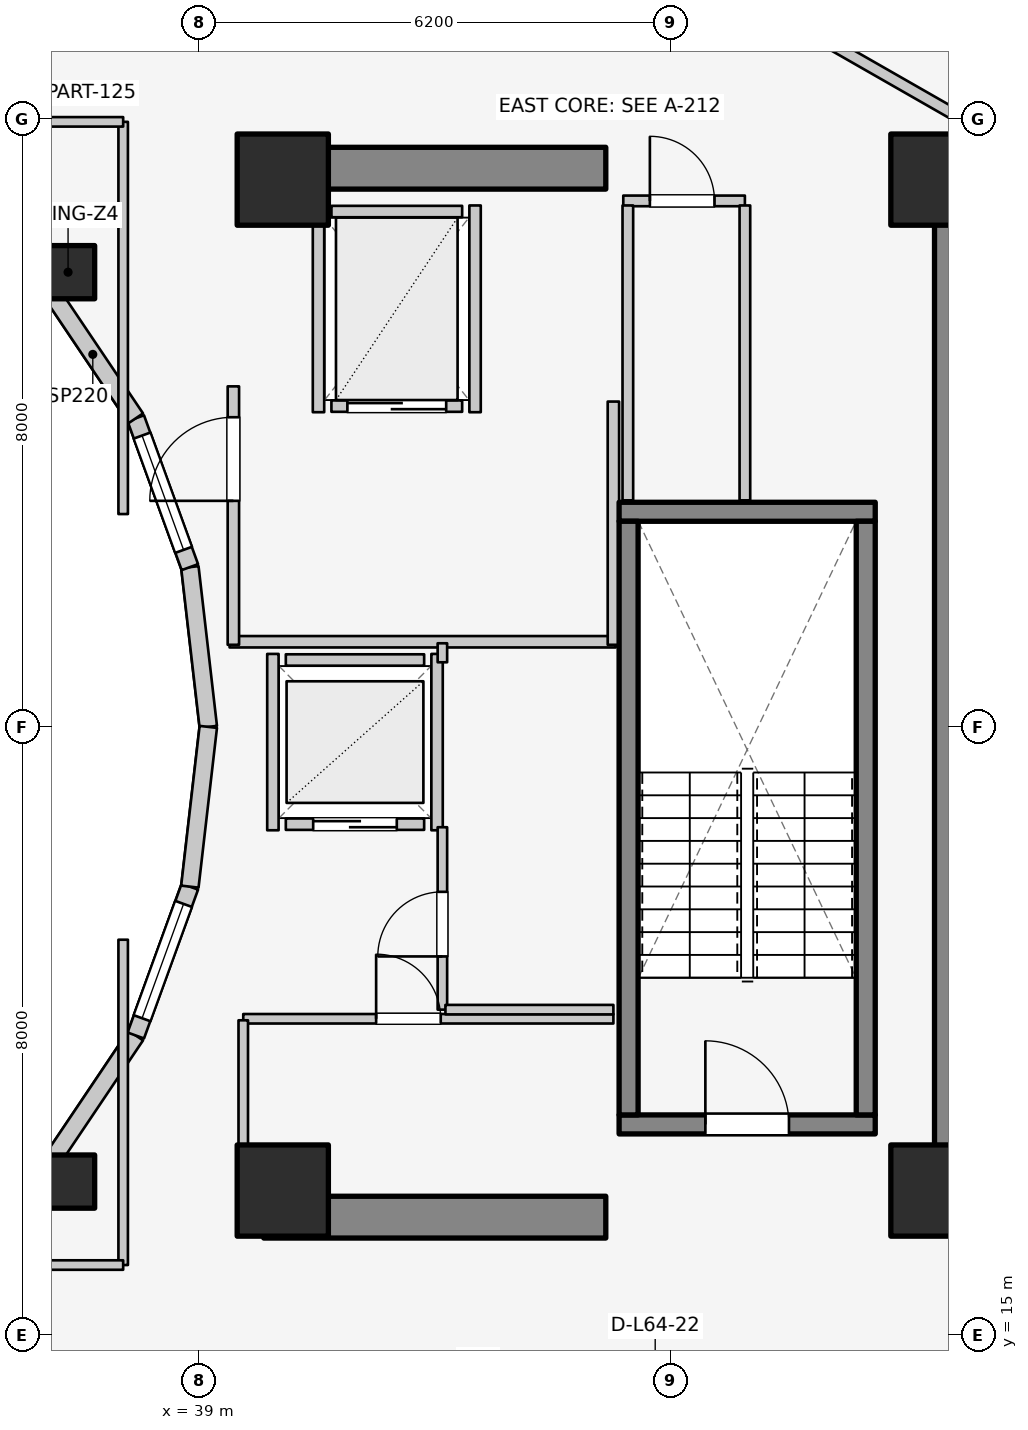
"""IFC4 building model, lengths in metres.
Left out: names, types, materials, properties, quantities, classifications, styles, units other than length and angle.
Written with IfcOpenShell. Run it as: python <this file> out.ifc"""

import sys

from ifc_helpers import new_model, si_unit, direction, frame, frame_2d, origin, origin_2d, place, context, subcontext, project, spatial, rectangle, extrude, element, fill, save


model = new_model("IFC4")
c1 = context("Model", 3, precision=1e-05, world=origin(), true_north=direction((0.0, 1.0)))
c2 = subcontext(c1, "Body", "Model", "MODEL_VIEW")
j1 = project(units=[si_unit("LENGTHUNIT", "METRE"), si_unit("PLANEANGLEUNIT", "RADIAN")], contexts=[c1])
p1 = place(None, origin())
s1 = spatial("IfcSite", under=j1, at=p1, CompositionType="ELEMENT")
p2 = place(p1, origin())
s2 = spatial("IfcBuilding", under=s1, at=p2, CompositionType="ELEMENT")
p3 = place(p2, frame((0.0, 0.0, 210.9)))
s3 = spatial("IfcBuildingStorey", under=s2, at=p3, CompositionType="ELEMENT", Elevation=210.9)
p4 = place(p3, frame((48.95, 17.05, 0.0), z_axis=(0.0, 0.0, 1.0), x_axis=(0.0, 1.0, 0.0)))
e1 = element("IfcWall", 1, at=p4, inside=s3, PredefinedType="SHEAR", context=c2, shape_type="SweptSolid", body=[
    extrude(rectangle(XDim=12.8, YDim=0.55, at=frame_2d((6.4, 0.0))), origin(), (0.0, 0.0, 1.0), 3.1),
])
for number, where, z_axis, x_axis in (
    (2, (39.85, 16.55, 0.0), (0.0, 0.0, 1.0), (1.0, 0.0, 0.0)),
    (3, (39.85, 30.35, 0.0), (0.0, 0.0, 1.0), (1.0, 0.0, 0.0)),
):
    element("IfcWall", number, at=place(p3, frame(where, z_axis=z_axis, x_axis=x_axis)), inside=s3, PredefinedType="SHEAR", context=c2, shape_type="SweptSolid", body=[
        extrude(rectangle(XDim=4.5, YDim=0.55, at=frame_2d((2.25, 0.0))), origin(), (0.0, 0.0, 1.0), 3.1),
    ])
p5 = place(p3, frame((44.525, 17.77, 0.0), z_axis=(0.0, 0.0, 1.0), x_axis=(1.0, 0.0, 0.0)))
e4 = element("IfcWall", 4, at=p5, inside=s3, PredefinedType="SOLIDWALL", context=c2, shape_type="SweptSolid", body=[
    extrude(rectangle(XDim=3.37, YDim=0.25, at=frame_2d((1.685, 0.0))), origin(), (0.0, 0.0, 1.0), 3.1),
])
p6 = place(p5, frame((1.135, 0.0, 0.0)))
e5 = element("IfcOpeningElement", 5, at=p6, cuts=e4, PredefinedType="OPENING", context=c2, shape_type="SweptSolid", body=[
    extrude(rectangle(XDim=1.1, YDim=2.1, at=frame_2d((0.55, 1.05))), frame((0.0, 0.135, 0.0), z_axis=(0.0, -1.0, 0.0), x_axis=(1.0, 0.0, 0.0)), (0.0, 0.0, 1.0), 0.27),
])
p7 = place(p3, frame((44.525, 25.83, 0.0), z_axis=(0.0, 0.0, 1.0), x_axis=(1.0, 0.0, 0.0)))
e6 = element("IfcWall", 6, at=p7, inside=s3, PredefinedType="SOLIDWALL", context=c2, shape_type="SweptSolid", body=[
    extrude(rectangle(XDim=3.37, YDim=0.25, at=frame_2d((1.685, 0.0))), origin(), (0.0, 0.0, 1.0), 3.1),
])
for number, where, z_axis, x_axis in (
    (7, (44.65, 17.895, 0.0), (0.0, 0.0, 1.0), (0.0, 1.0, 0.0)),
    (8, (47.77, 17.895, 0.0), (0.0, 0.0, 1.0), (0.0, 1.0, 0.0)),
):
    element("IfcWall", number, at=place(p3, frame(where, z_axis=z_axis, x_axis=x_axis)), inside=s3, PredefinedType="SOLIDWALL", context=c2, shape_type="SweptSolid", body=[
        extrude(rectangle(XDim=7.81, YDim=0.25, at=frame_2d((3.905, 0.0))), origin(), (0.0, 0.0, 1.0), 3.1),
    ])
for number, where, z_axis, x_axis in (
    (9, (40.1, 16.9, 0.0), (0.0, 0.0, 1.0), (1.0, 0.0, 0.0)),
    (10, (48.7, 16.9, 0.0), (0.0, 0.0, 1.0), (1.0, 0.0, 0.0)),
    (11, (48.7, 30.2, 0.0), (0.0, 0.0, 1.0), (1.0, 0.0, 0.0)),
    (12, (40.1, 30.2, 0.0), (0.0, 0.0, 1.0), (1.0, 0.0, 0.0)),
):
    element("IfcColumn", number, at=place(p3, frame(where, z_axis=z_axis, x_axis=x_axis)), inside=s3, PredefinedType="COLUMN", context=c2, shape_type="SweptSolid", body=[
        extrude(rectangle(XDim=1.2, YDim=1.2, at=origin_2d()), origin(), (0.0, 0.0, 1.0), 3.1),
    ])
for number, where, z_axis, x_axis in (
    (13, (37.275, 28.982, 0.0), (0.0, 0.0, 1.0), (1.0, 0.0, 0.0)),
    (14, (37.275, 17.018, 0.0), (0.0, 0.0, 1.0), (1.0, 0.0, 0.0)),
):
    element("IfcColumn", number, at=place(p3, frame(where, z_axis=z_axis, x_axis=x_axis)), inside=s3, PredefinedType="COLUMN", context=c2, shape_type="SweptSolid", body=[
        extrude(rectangle(XDim=0.7, YDim=0.7, at=origin_2d()), origin(), (0.0, 0.0, 1.0), 3.1),
    ])
p8 = place(p3, frame((39.12, 23.0, 0.0), z_axis=(0.0, 0.0, 1.0), x_axis=(-0.114711713601, 0.993398823617, 0.0)))
e15 = element("IfcWall", 15, at=p8, inside=s3, PredefinedType="STANDARD", context=c2, shape_type="SweptSolid", body=[
    extrude(rectangle(XDim=2.115, YDim=0.23, at=frame_2d((1.058, 0.0))), origin(), (0.0, 0.0, 1.0), 2.84),
])
p9 = place(p3, frame((38.877, 25.102, 0.0), z_axis=(0.0, 0.0, 1.0), x_axis=(-0.341423187295, 0.93990968033, 0.0)))
e16 = element("IfcWall", 16, at=p9, inside=s3, PredefinedType="STANDARD", context=c2, shape_type="SweptSolid", body=[
    extrude(rectangle(XDim=2.084, YDim=0.23, at=frame_2d((1.042, 0.0))), origin(), (0.0, 0.0, 1.0), 2.84),
])
p10 = place(p9, frame((0.242, 0.0, 0.85)))
e17 = element("IfcOpeningElement", 17, at=p10, cuts=e16, PredefinedType="OPENING", context=c2, shape_type="SweptSolid", body=[
    extrude(rectangle(XDim=1.6, YDim=1.65, at=frame_2d((0.8, 0.825))), frame((0.0, 0.125, 0.0), z_axis=(0.0, -1.0, 0.0), x_axis=(1.0, 0.0, 0.0)), (0.0, 0.0, 1.0), 0.25),
])
p11 = place(p3, frame((38.166, 27.06, 0.0), z_axis=(0.0, 0.0, 1.0), x_axis=(-0.558197800898, 0.829707909492, 0.0)))
e18 = element("IfcWall", 18, at=p11, inside=s3, PredefinedType="STANDARD", context=c2, shape_type="SweptSolid", body=[
    extrude(rectangle(XDim=2.027, YDim=0.23, at=frame_2d((1.013, 0.0))), origin(), (0.0, 0.0, 1.0), 2.16),
])
for number, where, z_axis, x_axis in (
    (19, (37.035, 28.742, 0.0), (0.0, 0.0, 1.0), (-0.753, 0.659, 0.0)),
    (20, (35.56, 15.968, 0.0), (0.0, 0.0, 1.0), (0.753, 0.659, 0.0)),
):
    element("IfcWall", number, at=place(p3, frame(where, z_axis=z_axis, x_axis=x_axis)), inside=s3, PredefinedType="STANDARD", context=c2, shape_type="SweptSolid", body=[
        extrude(rectangle(XDim=1.959, YDim=0.23, at=frame_2d((0.98, 0.0))), origin(), (0.0, 0.0, 1.0), 2.16),
    ])
p12 = place(p3, frame((37.035, 17.258, 0.0), z_axis=(0.0, 0.0, 1.0), x_axis=(0.558197800898, 0.829707909492, 0.0)))
e21 = element("IfcWall", 21, at=p12, inside=s3, PredefinedType="STANDARD", context=c2, shape_type="SweptSolid", body=[
    extrude(rectangle(XDim=2.027, YDim=0.23, at=frame_2d((1.013, 0.0))), origin(), (0.0, 0.0, 1.0), 2.16),
])
p13 = place(p3, frame((38.166, 18.94, 0.0), z_axis=(0.0, 0.0, 1.0), x_axis=(0.341423187295, 0.93990968033, 0.0)))
e22 = element("IfcWall", 22, at=p13, inside=s3, PredefinedType="STANDARD", context=c2, shape_type="SweptSolid", body=[
    extrude(rectangle(XDim=2.084, YDim=0.23, at=frame_2d((1.042, 0.0))), origin(), (0.0, 0.0, 1.0), 2.84),
])
p14 = place(p13, frame((0.242, 0.0, 0.85)))
e23 = element("IfcOpeningElement", 23, at=p14, cuts=e22, PredefinedType="OPENING", context=c2, shape_type="SweptSolid", body=[
    extrude(rectangle(XDim=1.6, YDim=1.65, at=frame_2d((0.8, 0.825))), frame((0.0, 0.125, 0.0), z_axis=(0.0, -1.0, 0.0), x_axis=(1.0, 0.0, 0.0)), (0.0, 0.0, 1.0), 0.25),
])
p15 = place(p3, frame((38.877, 20.898, 0.0), z_axis=(0.0, 0.0, 1.0), x_axis=(0.114711713601, 0.993398823617, 0.0)))
e24 = element("IfcWall", 24, at=p15, inside=s3, PredefinedType="STANDARD", context=c2, shape_type="SweptSolid", body=[
    extrude(rectangle(XDim=2.115, YDim=0.23, at=frame_2d((1.058, 0.0))), origin(), (0.0, 0.0, 1.0), 2.84),
])
p16 = place(p3, frame((50.761, 31.809, 0.0), z_axis=(0.0, 0.0, 1.0), x_axis=(-0.792713817907, 0.609593965603, 0.0)))
e25 = element("IfcWall", 25, at=p16, inside=s3, PredefinedType="STANDARD", context=c2, shape_type="SweptSolid", body=[
    extrude(rectangle(XDim=4.041, YDim=0.26, at=frame_2d((2.021, 0.0))), origin(), (0.0, 0.0, 1.0), 2.85),
])
p17 = place(p16, frame((1.271, 0.0, 0.75)))
e26 = element("IfcOpeningElement", 26, at=p17, cuts=e25, PredefinedType="OPENING", context=c2, shape_type="SweptSolid", body=[
    extrude(rectangle(XDim=1.5, YDim=1.6, at=frame_2d((0.75, 0.8))), frame((0.0, 0.14, 0.0), z_axis=(0.0, -1.0, 0.0), x_axis=(1.0, 0.0, 0.0)), (0.0, 0.0, 1.0), 0.28),
])
p18 = place(p3, frame((40.14, 21.72, 0.0), z_axis=(0.0, 0.0, 1.0), x_axis=(1.0, 0.0, 0.0)))
e27 = element("IfcWall", 27, at=p18, inside=s3, PredefinedType="SOLIDWALL", context=c2, shape_type="SweptSolid", body=[
    extrude(rectangle(XDim=1.82, YDim=0.15, at=frame_2d((0.91, 0.0))), origin(), (0.0, 0.0, 1.0), 2.12),
])
p19 = place(p18, frame((0.36, 0.0, 0.0)))
e28 = element("IfcOpeningElement", 28, at=p19, cuts=e27, PredefinedType="OPENING", context=c2, shape_type="SweptSolid", body=[
    extrude(rectangle(XDim=1.1, YDim=2.1, at=frame_2d((0.55, 1.05))), frame((0.0, 0.085, 0.0), z_axis=(0.0, -1.0, 0.0), x_axis=(1.0, 0.0, 0.0)), (0.0, 0.0, 1.0), 0.17),
])
p20 = place(p3, frame((40.14, 23.88, 0.0), z_axis=(0.0, 0.0, 1.0), x_axis=(1.0, 0.0, 0.0)))
e29 = element("IfcWall", 29, at=p20, inside=s3, PredefinedType="SOLIDWALL", context=c2, shape_type="SweptSolid", body=[
    extrude(rectangle(XDim=1.82, YDim=0.15, at=frame_2d((0.91, 0.0))), origin(), (0.0, 0.0, 1.0), 2.12),
])
p21 = place(p3, frame((39.97, 21.64, 0.0), z_axis=(0.0, 0.0, 1.0), x_axis=(0.0, 1.0, 0.0)))
e30 = element("IfcWall", 30, at=p21, inside=s3, PredefinedType="SOLIDWALL", context=c2, shape_type="SweptSolid", body=[
    extrude(rectangle(XDim=2.32, YDim=0.15, at=frame_2d((1.16, 0.0))), origin(), (0.0, 0.0, 1.0), 2.12),
])
p22 = place(p3, frame((42.13, 21.64, 0.0), z_axis=(0.0, 0.0, 1.0), x_axis=(0.0, 1.0, 0.0)))
e31 = element("IfcWall", 31, at=p22, inside=s3, PredefinedType="SOLIDWALL", context=c2, shape_type="SweptSolid", body=[
    extrude(rectangle(XDim=2.32, YDim=0.15, at=frame_2d((1.16, 0.0))), origin(), (0.0, 0.0, 1.0), 2.855),
])
p23 = place(p3, frame((40.74, 27.22, 0.0), z_axis=(0.0, 0.0, 1.0), x_axis=(1.0, 0.0, 0.0)))
e32 = element("IfcWall", 32, at=p23, inside=s3, PredefinedType="SOLIDWALL", context=c2, shape_type="SweptSolid", body=[
    extrude(rectangle(XDim=1.72, YDim=0.15, at=frame_2d((0.86, 0.0))), origin(), (0.0, 0.0, 1.0), 2.855),
])
p24 = place(p23, frame((0.21, 0.0, 0.0)))
e33 = element("IfcOpeningElement", 33, at=p24, cuts=e32, PredefinedType="OPENING", context=c2, shape_type="SweptSolid", body=[
    extrude(rectangle(XDim=1.3, YDim=2.1, at=frame_2d((0.65, 1.05))), frame((0.0, 0.085, 0.0), z_axis=(0.0, -1.0, 0.0), x_axis=(1.0, 0.0, 0.0)), (0.0, 0.0, 1.0), 0.17),
])
p25 = place(p3, frame((40.74, 29.78, 0.0), z_axis=(0.0, 0.0, 1.0), x_axis=(1.0, 0.0, 0.0)))
e34 = element("IfcWall", 34, at=p25, inside=s3, PredefinedType="SOLIDWALL", context=c2, shape_type="SweptSolid", body=[
    extrude(rectangle(XDim=1.72, YDim=0.15, at=frame_2d((0.86, 0.0))), origin(), (0.0, 0.0, 1.0), 2.855),
])
for number, where, z_axis, x_axis in (
    (35, (40.57, 27.14, 0.0), (0.0, 0.0, 1.0), (0.0, 1.0, 0.0)),
    (36, (42.63, 27.14, 0.0), (0.0, 0.0, 1.0), (0.0, 1.0, 0.0)),
):
    element("IfcWall", number, at=place(p3, frame(where, z_axis=z_axis, x_axis=x_axis)), inside=s3, PredefinedType="SOLIDWALL", context=c2, shape_type="SweptSolid", body=[
        extrude(rectangle(XDim=2.72, YDim=0.15, at=frame_2d((1.36, 0.0))), origin(), (0.0, 0.0, 1.0), 2.855),
    ])
p26 = place(p3, frame((39.4, 24.12, 0.0), z_axis=(0.0, 0.0, 1.0), x_axis=(1.0, 0.0, 0.0)))
e37 = element("IfcWall", 37, at=p26, inside=s3, PredefinedType="PARTITIONING", context=c2, shape_type="SweptSolid", body=[
    extrude(rectangle(XDim=5.08, YDim=0.15, at=frame_2d((2.54, 0.0))), origin(), (0.0, 0.0, 1.0), 2.12),
])
p27 = place(p3, frame((44.45, 24.08, 0.0), z_axis=(0.0, 0.0, 1.0), x_axis=(0.0, 1.0, 0.0)))
e38 = element("IfcWall", 38, at=p27, inside=s3, PredefinedType="PARTITIONING", context=c2, shape_type="SweptSolid", body=[
    extrude(rectangle(XDim=3.2, YDim=0.15, at=frame_2d((1.6, 0.0))), origin(), (0.0, 0.0, 1.0), 2.855),
])
p28 = place(p3, frame((39.45, 24.08, 0.0), z_axis=(0.0, 0.0, 1.0), x_axis=(0.0, 1.0, 0.0)))
e39 = element("IfcWall", 39, at=p28, inside=s3, PredefinedType="PARTITIONING", context=c2, shape_type="SweptSolid", body=[
    extrude(rectangle(XDim=3.4, YDim=0.15, at=frame_2d((1.7, 0.0))), origin(), (0.0, 0.0, 1.0), 2.855),
])
p29 = place(p28, frame((1.894, 0.0, 0.0)))
e40 = element("IfcOpeningElement", 40, at=p29, cuts=e39, PredefinedType="OPENING", context=c2, shape_type="SweptSolid", body=[
    extrude(rectangle(XDim=1.1, YDim=2.1, at=frame_2d((0.55, 1.05))), frame((0.0, 0.085, 0.0), z_axis=(0.0, -1.0, 0.0), x_axis=(1.0, 0.0, 0.0)), (0.0, 0.0, 1.0), 0.17),
])
p30 = place(p3, frame((39.58, 19.16, 0.0), z_axis=(0.0, 0.0, 1.0), x_axis=(1.0, 0.0, 0.0)))
e41 = element("IfcWall", 41, at=p30, inside=s3, PredefinedType="PARTITIONING", context=c2, shape_type="SweptSolid", body=[
    extrude(rectangle(XDim=4.87, YDim=0.125, at=frame_2d((2.435, 0.0))), origin(), (0.0, 0.0, 1.0), 2.12),
])
p31 = place(p30, frame((1.748, 0.0, 0.0)))
e42 = element("IfcOpeningElement", 42, at=p31, cuts=e41, PredefinedType="OPENING", context=c2, shape_type="SweptSolid", body=[
    extrude(rectangle(XDim=0.85, YDim=2.05, at=frame_2d((0.425, 1.025))), frame((0.0, 0.073, 0.0), z_axis=(0.0, -1.0, 0.0), x_axis=(1.0, 0.0, 0.0)), (0.0, 0.0, 1.0), 0.145),
])
p32 = place(p3, frame((39.58, 17.1, 0.0), z_axis=(0.0, 0.0, 1.0), x_axis=(0.0, 1.0, 0.0)))
e43 = element("IfcWall", 43, at=p32, inside=s3, PredefinedType="PARTITIONING", context=c2, shape_type="SweptSolid", body=[
    extrude(rectangle(XDim=2.04, YDim=0.125, at=frame_2d((1.02, 0.0))), origin(), (0.0, 0.0, 1.0), 2.232),
])
p33 = place(p3, frame((42.2, 19.28, 0.0), z_axis=(0.0, 0.0, 1.0), x_axis=(0.0, 1.0, 0.0)))
e44 = element("IfcWall", 44, at=p33, inside=s3, PredefinedType="PARTITIONING", context=c2, shape_type="SweptSolid", body=[
    extrude(rectangle(XDim=2.4, YDim=0.125, at=frame_2d((1.2, 0.0))), origin(), (0.0, 0.0, 1.0), 2.855),
])
p34 = place(p33, frame((0.7, 0.0, 0.0)))
e45 = element("IfcOpeningElement", 45, at=p34, cuts=e44, PredefinedType="OPENING", context=c2, shape_type="SweptSolid", body=[
    extrude(rectangle(XDim=0.85, YDim=2.05, at=frame_2d((0.425, 1.025))), frame((0.0, 0.073, 0.0), z_axis=(0.0, -1.0, 0.0), x_axis=(1.0, 0.0, 0.0)), (0.0, 0.0, 1.0), 0.145),
])
p35 = place(p3, frame((42.2, 23.85, 0.0), z_axis=(0.0, 0.0, 1.0), x_axis=(0.0, 1.0, 0.0)))
e46 = element("IfcWall", 46, at=p35, inside=s3, PredefinedType="PARTITIONING", context=c2, shape_type="SweptSolid", body=[
    extrude(rectangle(XDim=0.25, YDim=0.125, at=frame_2d((0.125, 0.0))), origin(), (0.0, 0.0, 1.0), 2.855),
])
p36 = place(p3, frame((42.24, 19.28, 0.0), z_axis=(0.0, 0.0, 1.0), x_axis=(1.0, 0.0, 0.0)))
e47 = element("IfcWall", 47, at=p36, inside=s3, PredefinedType="PARTITIONING", context=c2, shape_type="SweptSolid", body=[
    extrude(rectangle(XDim=2.21, YDim=0.125, at=frame_2d((1.105, 0.0))), origin(), (0.0, 0.0, 1.0), 2.12),
])
p37 = place(p3, frame((44.58, 29.92, 0.0), z_axis=(0.0, 0.0, 1.0), x_axis=(1.0, 0.0, 0.0)))
e48 = element("IfcWall", 48, at=p37, inside=s3, PredefinedType="PLUMBINGWALL", context=c2, shape_type="SweptSolid", body=[
    extrude(rectangle(XDim=1.6, YDim=0.14, at=frame_2d((0.8, 0.0))), origin(), (0.0, 0.0, 1.0), 2.855),
])
p38 = place(p37, frame((0.35, 0.0, 0.0)))
e49 = element("IfcOpeningElement", 49, at=p38, cuts=e48, PredefinedType="OPENING", context=c2, shape_type="SweptSolid", body=[
    extrude(rectangle(XDim=0.85, YDim=2.05, at=frame_2d((0.425, 1.025))), frame((0.0, 0.08, 0.0), z_axis=(0.0, -1.0, 0.0), x_axis=(1.0, 0.0, 0.0)), (0.0, 0.0, 1.0), 0.16),
])
for number, where, z_axis, x_axis in (
    (50, (44.64, 25.98, 0.0), (0.0, 0.0, 1.0), (0.0, 1.0, 0.0)),
    (51, (46.18, 25.98, 0.0), (0.0, 0.0, 1.0), (0.0, 1.0, 0.0)),
):
    element("IfcWall", number, at=place(p3, frame(where, z_axis=z_axis, x_axis=x_axis)), inside=s3, PredefinedType="PLUMBINGWALL", context=c2, shape_type="SweptSolid", body=[
        extrude(rectangle(XDim=3.88, YDim=0.14, at=frame_2d((1.94, 0.0))), origin(), (0.0, 0.0, 1.0), 2.855),
    ])
p39 = place(p3, frame((35.55, 30.015, 0.0), z_axis=(0.0, 0.0, 1.0), x_axis=(0.523992004803, 0.851723182086, 0.0)))
e52 = element("IfcWall", 52, at=p39, inside=s3, PredefinedType="PARTITIONING", context=c2, shape_type="SweptSolid", body=[
    extrude(rectangle(XDim=3.101, YDim=0.125, at=frame_2d((1.551, 0.0))), origin(), (0.0, 0.0, 1.0), 2.376),
])
p40 = place(p3, frame((38.0, 25.8, 0.0), z_axis=(0.0, 0.0, 1.0), x_axis=(0.0, 1.0, 0.0)))
e53 = element("IfcWall", 53, at=p40, inside=s3, PredefinedType="PARTITIONING", context=c2, shape_type="SweptSolid", body=[
    extrude(rectangle(XDim=5.16, YDim=0.125, at=frame_2d((2.58, 0.0))), origin(), (0.0, 0.0, 1.0), 2.232),
])
p41 = place(p3, frame((35.4, 30.96, 0.0), z_axis=(0.0, 0.0, 1.0), x_axis=(1.0, 0.0, 0.0)))
e54 = element("IfcWall", 54, at=p41, inside=s3, PredefinedType="PARTITIONING", context=c2, shape_type="SweptSolid", body=[
    extrude(rectangle(XDim=2.6, YDim=0.125, at=frame_2d((1.3, 0.0))), origin(), (0.0, 0.0, 1.0), 2.376),
])
p42 = place(p3, frame((38.0, 15.92, 0.0), z_axis=(0.0, 0.0, 1.0), x_axis=(0.0, 1.0, 0.0)))
e55 = element("IfcWall", 55, at=p42, inside=s3, PredefinedType="PARTITIONING", context=c2, shape_type="SweptSolid", body=[
    extrude(rectangle(XDim=4.28, YDim=0.125, at=frame_2d((2.14, 0.0))), origin(), (0.0, 0.0, 1.0), 2.232),
])
p43 = place(p3, frame((35.4, 15.92, 0.0), z_axis=(0.0, 0.0, 1.0), x_axis=(1.0, 0.0, 0.0)))
e56 = element("IfcWall", 56, at=p43, inside=s3, PredefinedType="PARTITIONING", context=c2, shape_type="SweptSolid", body=[
    extrude(rectangle(XDim=2.6, YDim=0.125, at=frame_2d((1.3, 0.0))), origin(), (0.0, 0.0, 1.0), 2.232),
])
p44 = place(p3, frame((46.757, 32.305, 0.0), z_axis=(0.0, 0.0, 1.0), x_axis=(0.867991349648, -0.496579315857, 0.0)))
e57 = element("IfcWall", 57, at=p44, inside=s3, PredefinedType="PARTITIONING", context=c2, shape_type="SweptSolid", body=[
    extrude(rectangle(XDim=2.567, YDim=0.15, at=frame_2d((1.283, 0.0))), origin(), (0.0, 0.0, 1.0), 2.22),
])
p45 = place(p10, origin())
e58 = element("IfcWindow", 58, at=p45, inside=s3, PartitioningType="SINGLE_PANEL", PredefinedType="WINDOW", context=c2, shape_type="SweptSolid", body=[
    extrude(rectangle(XDim=1.6, YDim=1.65, at=frame_2d((0.8, 0.825))), frame((0.0, 0.03, 0.0), z_axis=(0.0, -1.0, 0.0), x_axis=(1.0, 0.0, 0.0)), (0.0, 0.0, 1.0), 0.06),
])
fill(e17, e58)
p46 = place(p14, origin())
e59 = element("IfcWindow", 59, at=p46, inside=s3, PartitioningType="SINGLE_PANEL", PredefinedType="WINDOW", context=c2, shape_type="SweptSolid", body=[
    extrude(rectangle(XDim=1.6, YDim=1.65, at=frame_2d((0.8, 0.825))), frame((0.0, 0.03, 0.0), z_axis=(0.0, -1.0, 0.0), x_axis=(1.0, 0.0, 0.0)), (0.0, 0.0, 1.0), 0.06),
])
fill(e23, e59)
p47 = place(p6, origin())
e60 = element("IfcDoor", 60, at=p47, inside=s3, OperationType="SINGLE_SWING_LEFT", PredefinedType="DOOR", context=c2, shape_type="SweptSolid", body=[
    extrude(rectangle(XDim=1.1, YDim=2.1, at=frame_2d((0.55, 1.05))), frame((0.0, 0.025, 0.0), z_axis=(0.0, -1.0, 0.0), x_axis=(1.0, 0.0, 0.0)), (0.0, 0.0, 1.0), 0.05),
])
fill(e5, e60)
p48 = place(p19, origin())
e61 = element("IfcDoor", 61, at=p48, inside=s3, OperationType="DOUBLE_DOOR_SLIDING", PredefinedType="DOOR", context=c2, shape_type="SweptSolid", body=[
    extrude(rectangle(XDim=1.1, YDim=2.1, at=frame_2d((0.55, 1.05))), frame((0.0, 0.025, 0.0), z_axis=(0.0, -1.0, 0.0), x_axis=(1.0, 0.0, 0.0)), (0.0, 0.0, 1.0), 0.05),
])
fill(e28, e61)
p49 = place(p24, origin())
e62 = element("IfcDoor", 62, at=p49, inside=s3, OperationType="DOUBLE_DOOR_SLIDING", PredefinedType="DOOR", context=c2, shape_type="SweptSolid", body=[
    extrude(rectangle(XDim=1.3, YDim=2.1, at=frame_2d((0.65, 1.05))), frame((0.0, 0.025, 0.0), z_axis=(0.0, -1.0, 0.0), x_axis=(1.0, 0.0, 0.0)), (0.0, 0.0, 1.0), 0.05),
])
fill(e33, e62)
p50 = place(p29, origin())
e63 = element("IfcDoor", 63, at=p50, inside=s3, OperationType="SINGLE_SWING_LEFT", PredefinedType="DOOR", context=c2, shape_type="SweptSolid", body=[
    extrude(rectangle(XDim=1.1, YDim=2.1, at=frame_2d((0.55, 1.05))), frame((0.0, 0.025, 0.0), z_axis=(0.0, -1.0, 0.0), x_axis=(1.0, 0.0, 0.0)), (0.0, 0.0, 1.0), 0.05),
])
fill(e40, e63)
p51 = place(p31, origin())
e64 = element("IfcDoor", 64, at=p51, inside=s3, OperationType="SINGLE_SWING_LEFT", PredefinedType="DOOR", context=c2, shape_type="SweptSolid", body=[
    extrude(rectangle(XDim=0.85, YDim=2.05, at=frame_2d((0.425, 1.025))), frame((0.0, 0.025, 0.0), z_axis=(0.0, -1.0, 0.0), x_axis=(1.0, 0.0, 0.0)), (0.0, 0.0, 1.0), 0.05),
])
fill(e42, e64)
p52 = place(p34, origin())
e65 = element("IfcDoor", 65, at=p52, inside=s3, OperationType="SINGLE_SWING_LEFT", PredefinedType="DOOR", context=c2, shape_type="SweptSolid", body=[
    extrude(rectangle(XDim=0.85, YDim=2.05, at=frame_2d((0.425, 1.025))), frame((0.0, 0.025, 0.0), z_axis=(0.0, -1.0, 0.0), x_axis=(1.0, 0.0, 0.0)), (0.0, 0.0, 1.0), 0.05),
])
fill(e45, e65)
p53 = place(p38, origin())
e66 = element("IfcDoor", 66, at=p53, inside=s3, OperationType="SINGLE_SWING_LEFT", PredefinedType="DOOR", context=c2, shape_type="SweptSolid", body=[
    extrude(rectangle(XDim=0.85, YDim=2.05, at=frame_2d((0.425, 1.025))), frame((0.0, 0.025, 0.0), z_axis=(0.0, -1.0, 0.0), x_axis=(1.0, 0.0, 0.0)), (0.0, 0.0, 1.0), 0.05),
])
fill(e49, e66)
save(model, sys.argv[1])
